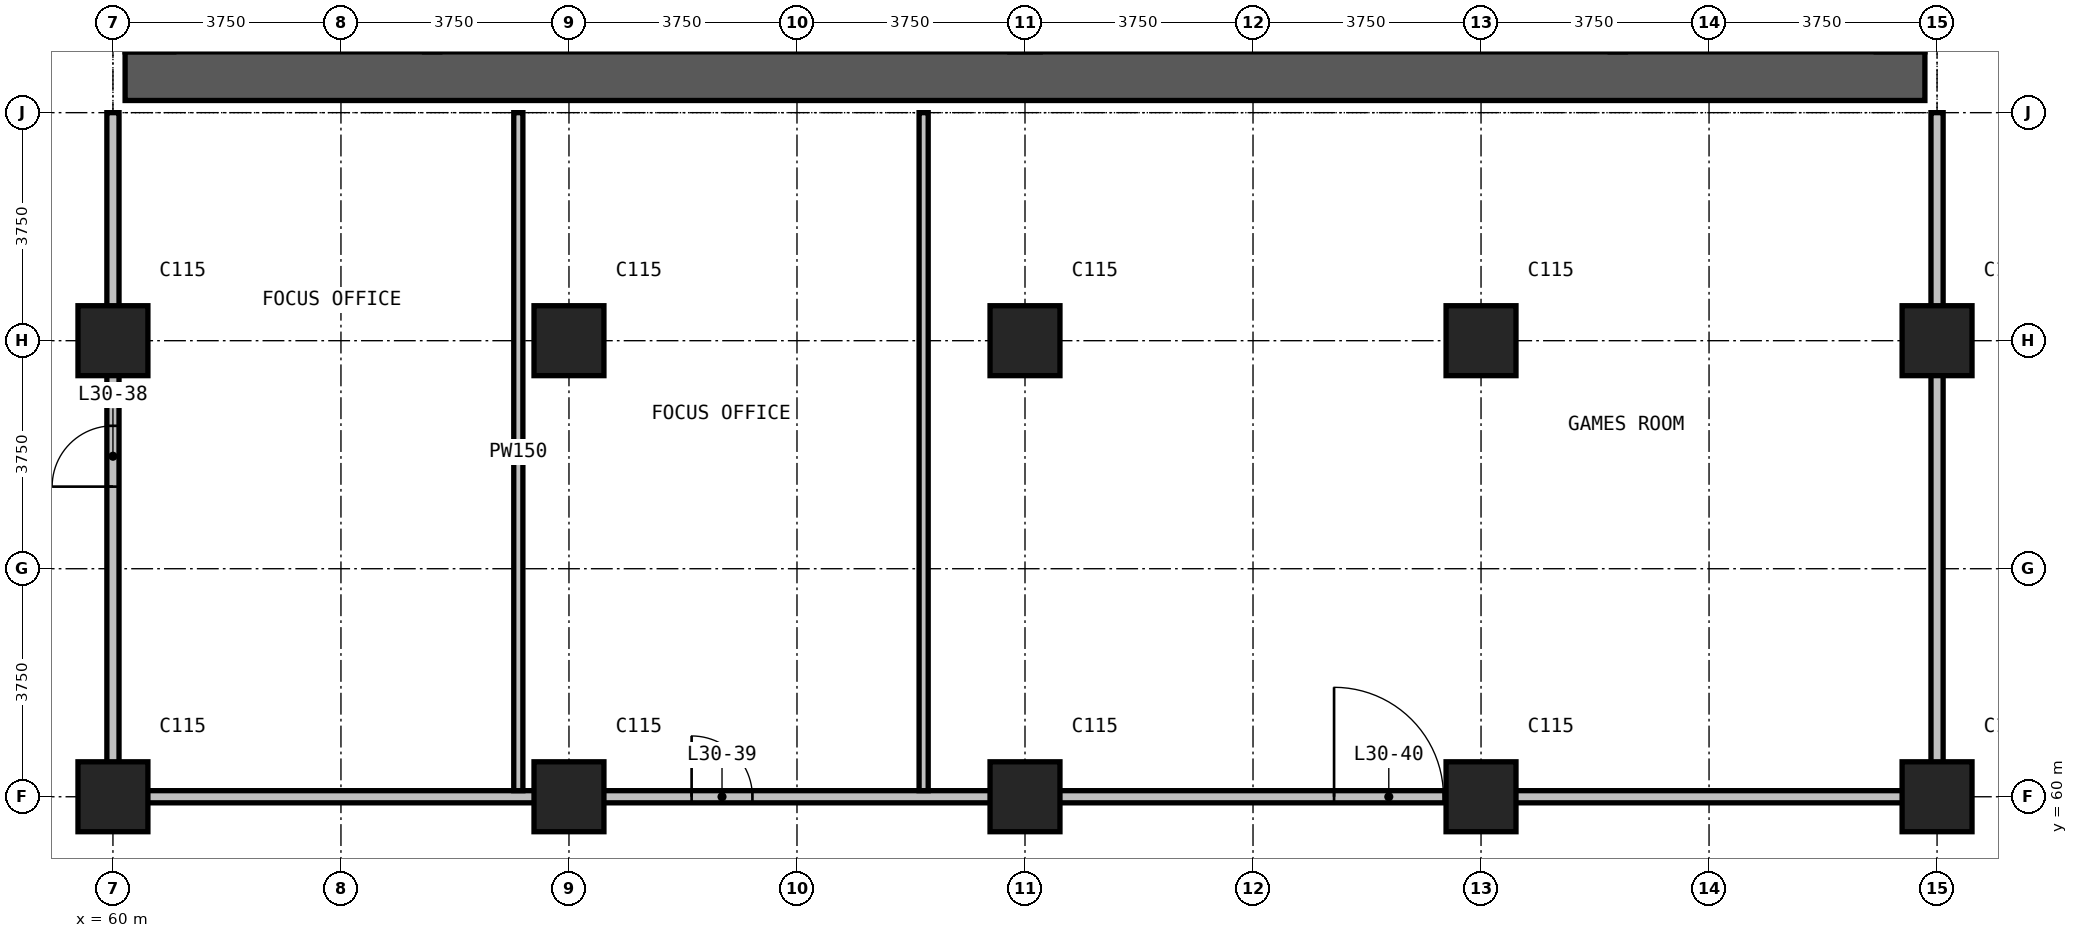
"""IFC4 building model, lengths in metres.
Left out: names, types, materials, properties, quantities, classifications, styles, units other than length and angle.
Written with IfcOpenShell. Run it as: python <this file> out.ifc"""

import sys

from ifc_helpers import new_model, si_unit, direction, frame, frame_2d, origin, origin_2d, place, context, subcontext, project, spatial, rectangle, extrude, element, fill, save


model = new_model("IFC4")
c1 = context("Model", 3, precision=1e-05, world=origin(), true_north=direction((0.0, 1.0)))
c2 = subcontext(c1, "Body", "Model", "MODEL_VIEW")
j1 = project(units=[si_unit("LENGTHUNIT", "METRE"), si_unit("PLANEANGLEUNIT", "RADIAN")], contexts=[c1])
p1 = place(None, origin())
s1 = spatial("IfcSite", under=j1, at=p1, CompositionType="ELEMENT")
p2 = place(p1, origin())
s2 = spatial("IfcBuilding", under=s1, at=p2, CompositionType="ELEMENT")
p3 = place(p2, frame((0.0, 0.0, 121.6)))
s3 = spatial("IfcBuildingStorey", under=s2, at=p3, CompositionType="ELEMENT", Elevation=121.6)
for number, where, z_axis, x_axis in (
    (1, (60.0, 60.0, 0.0), (0.0, 0.0, 1.0), (1.0, 0.0, 0.0)),
    (2, (60.0, 67.5, 0.0), (0.0, 0.0, 1.0), (1.0, 0.0, 0.0)),
    (3, (67.5, 60.0, 0.0), (0.0, 0.0, 1.0), (1.0, 0.0, 0.0)),
    (4, (67.5, 67.5, 0.0), (0.0, 0.0, 1.0), (1.0, 0.0, 0.0)),
    (5, (75.0, 60.0, 0.0), (0.0, 0.0, 1.0), (1.0, 0.0, 0.0)),
    (6, (75.0, 67.5, 0.0), (0.0, 0.0, 1.0), (1.0, 0.0, 0.0)),
    (7, (82.5, 60.0, 0.0), (0.0, 0.0, 1.0), (1.0, 0.0, 0.0)),
    (8, (82.5, 67.5, 0.0), (0.0, 0.0, 1.0), (1.0, 0.0, 0.0)),
    (9, (90.0, 60.0, 0.0), (0.0, 0.0, 1.0), (1.0, 0.0, 0.0)),
    (10, (90.0, 67.5, 0.0), (0.0, 0.0, 1.0), (1.0, 0.0, 0.0)),
):
    element("IfcColumn", number, at=place(p3, frame(where, z_axis=z_axis, x_axis=x_axis)), inside=s3, PredefinedType="COLUMN", context=c2, shape_type="SweptSolid", body=[
        extrude(rectangle(XDim=1.15, YDim=1.15, at=origin_2d()), origin(), (0.0, 0.0, 1.0), 3.6),
    ])
p4 = place(p3, frame((60.2, 71.85, 0.0), z_axis=(0.0, 0.0, 1.0), x_axis=(1.0, 0.0, 0.0)))
e11 = element("IfcWall", 11, at=p4, inside=s3, PredefinedType="SHEAR", context=c2, shape_type="SweptSolid", body=[
    extrude(rectangle(XDim=29.6, YDim=0.8, at=frame_2d((14.8, 0.0))), origin(), (0.0, 0.0, 1.0), 3.6),
])
p5 = place(p3, frame((60.1, 60.0, 0.0), z_axis=(0.0, 0.0, 1.0), x_axis=(1.0, 0.0, 0.0)))
e12 = element("IfcWall", 12, at=p5, inside=s3, PredefinedType="PARTITIONING", context=c2, shape_type="SweptSolid", body=[
    extrude(rectangle(XDim=29.8, YDim=0.2, at=frame_2d((14.9, 0.0))), origin(), (0.0, 0.0, 1.0), 3.3),
])
p6 = place(p5, frame((9.417, 0.0, 0.0)))
e13 = element("IfcOpeningElement", 13, at=p6, cuts=e12, PredefinedType="OPENING", context=c2, shape_type="SweptSolid", body=[
    extrude(rectangle(XDim=1.0, YDim=2.2, at=frame_2d((0.5, 1.1))), frame((0.0, 0.11, 0.0), z_axis=(0.0, -1.0, 0.0), x_axis=(1.0, 0.0, 0.0)), (0.0, 0.0, 1.0), 0.22),
])
p7 = place(p5, frame((19.983, 0.0, 0.0)))
e14 = element("IfcOpeningElement", 14, at=p7, cuts=e12, PredefinedType="OPENING", context=c2, shape_type="SweptSolid", body=[
    extrude(rectangle(XDim=1.8, YDim=2.2, at=frame_2d((0.9, 1.1))), frame((0.0, 0.11, 0.0), z_axis=(0.0, -1.0, 0.0), x_axis=(1.0, 0.0, 0.0)), (0.0, 0.0, 1.0), 0.22),
])
p8 = place(p3, frame((60.0, 59.9, 0.0), z_axis=(0.0, 0.0, 1.0), x_axis=(0.0, 1.0, 0.0)))
e15 = element("IfcWall", 15, at=p8, inside=s3, PredefinedType="PARTITIONING", context=c2, shape_type="SweptSolid", body=[
    extrude(rectangle(XDim=11.35, YDim=0.2, at=frame_2d((5.675, 0.0))), origin(), (0.0, 0.0, 1.0), 3.3),
])
p9 = place(p8, frame((5.2, 0.0, 0.0)))
e16 = element("IfcOpeningElement", 16, at=p9, cuts=e15, PredefinedType="OPENING", context=c2, shape_type="SweptSolid", body=[
    extrude(rectangle(XDim=1.0, YDim=2.2, at=frame_2d((0.5, 1.1))), frame((0.0, 0.11, 0.0), z_axis=(0.0, -1.0, 0.0), x_axis=(1.0, 0.0, 0.0)), (0.0, 0.0, 1.0), 0.22),
])
p10 = place(p3, frame((90.0, 59.9, 0.0), z_axis=(0.0, 0.0, 1.0), x_axis=(0.0, 1.0, 0.0)))
e17 = element("IfcWall", 17, at=p10, inside=s3, PredefinedType="PARTITIONING", context=c2, shape_type="SweptSolid", body=[
    extrude(rectangle(XDim=11.35, YDim=0.2, at=frame_2d((5.675, 0.0))), origin(), (0.0, 0.0, 1.0), 3.3),
])
for number, where, z_axis, x_axis in (
    (18, (66.667, 60.1, 0.0), (0.0, 0.0, 1.0), (0.0, 1.0, 0.0)),
    (19, (73.333, 60.1, 0.0), (0.0, 0.0, 1.0), (0.0, 1.0, 0.0)),
):
    element("IfcWall", number, at=place(p3, frame(where, z_axis=z_axis, x_axis=x_axis)), inside=s3, PredefinedType="PARTITIONING", context=c2, shape_type="SweptSolid", body=[
        extrude(rectangle(XDim=11.15, YDim=0.15, at=frame_2d((5.575, 0.0))), origin(), (0.0, 0.0, 1.0), 3.3),
    ])
p11 = place(p9, origin())
e20 = element("IfcDoor", 20, at=p11, inside=s3, OperationType="SINGLE_SWING_LEFT", PredefinedType="DOOR", context=c2, shape_type="SweptSolid", body=[
    extrude(rectangle(XDim=1.0, YDim=2.2, at=frame_2d((0.5, 1.1))), frame((0.0, 0.025, 0.0), z_axis=(0.0, -1.0, 0.0), x_axis=(1.0, 0.0, 0.0)), (0.0, 0.0, 1.0), 0.05),
])
fill(e16, e20)
p12 = place(p6, origin())
e21 = element("IfcDoor", 21, at=p12, inside=s3, OperationType="SINGLE_SWING_LEFT", PredefinedType="DOOR", context=c2, shape_type="SweptSolid", body=[
    extrude(rectangle(XDim=1.0, YDim=2.2, at=frame_2d((0.5, 1.1))), frame((0.0, 0.025, 0.0), z_axis=(0.0, -1.0, 0.0), x_axis=(1.0, 0.0, 0.0)), (0.0, 0.0, 1.0), 0.05),
])
fill(e13, e21)
p13 = place(p7, origin())
e22 = element("IfcDoor", 22, at=p13, inside=s3, OperationType="DOUBLE_DOOR_SINGLE_SWING", PredefinedType="DOOR", context=c2, shape_type="SweptSolid", body=[
    extrude(rectangle(XDim=1.8, YDim=2.2, at=frame_2d((0.9, 1.1))), frame((0.0, 0.025, 0.0), z_axis=(0.0, -1.0, 0.0), x_axis=(1.0, 0.0, 0.0)), (0.0, 0.0, 1.0), 0.05),
])
fill(e14, e22)
save(model, sys.argv[1])
